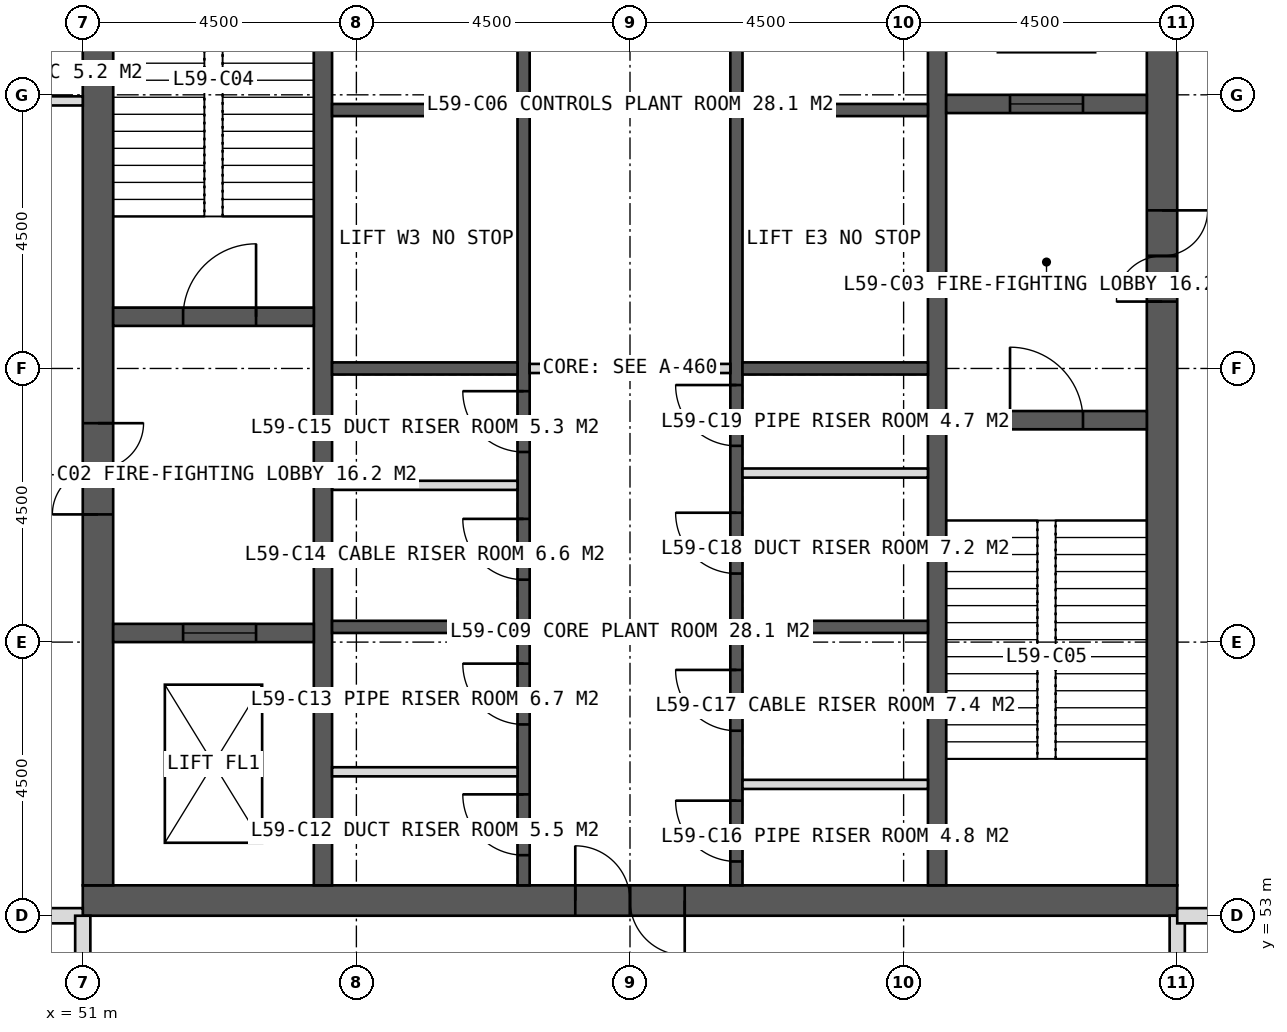
"""IFC4 building model, lengths in metres.
Left out: names, types, materials, properties, quantities, classifications, styles, units other than length and angle.
Written with IfcOpenShell. Run it as: python <this file> out.ifc"""

import sys

from ifc_helpers import new_model, si_unit, direction, frame, frame_2d, origin, place, context, subcontext, project, spatial, rectangle, extrude, element, fill, save


model = new_model("IFC4")
c1 = context("Model", 3, precision=1e-05, world=origin(), true_north=direction((0.0, 1.0)))
c2 = subcontext(c1, "Body", "Model", "MODEL_VIEW")
j1 = project(units=[si_unit("LENGTHUNIT", "METRE"), si_unit("PLANEANGLEUNIT", "RADIAN")], contexts=[c1])
p1 = place(None, origin())
s1 = spatial("IfcSite", under=j1, at=p1, CompositionType="ELEMENT")
p2 = place(p1, origin())
s2 = spatial("IfcBuilding", under=s1, at=p2, CompositionType="ELEMENT")
p3 = place(p2, frame((0.0, 0.0, 245.0)))
s3 = spatial("IfcBuildingStorey", under=s2, at=p3, CompositionType="ELEMENT", Elevation=245.0)
p4 = place(p3, frame((51.0, 53.25, 0.0), z_axis=(0.0, 0.0, 1.0), x_axis=(1.0, 0.0, 0.0)))
e1 = element("IfcWall", 1, at=p4, inside=s3, PredefinedType="SHEAR", context=c2, shape_type="SweptSolid", body=[
    extrude(rectangle(XDim=18.0, YDim=0.5, at=frame_2d((9.0, 0.0))), origin(), (0.0, 0.0, 1.0), 5.0),
])
p5 = place(p4, frame((8.1, 0.0, 0.0)))
e2 = element("IfcOpeningElement", 2, at=p5, cuts=e1, PredefinedType="OPENING", context=c2, shape_type="SweptSolid", body=[
    extrude(rectangle(XDim=1.8, YDim=2.2, at=frame_2d((0.9, 1.1))), frame((0.0, 0.26, 0.0), z_axis=(0.0, -1.0, 0.0), x_axis=(1.0, 0.0, 0.0)), (0.0, 0.0, 1.0), 0.52),
])
p6 = place(p3, frame((51.25, 53.5, 0.0), z_axis=(0.0, 0.0, 1.0), x_axis=(0.0, 1.0, 0.0)))
e3 = element("IfcWall", 3, at=p6, inside=s3, PredefinedType="SHEAR", context=c2, shape_type="SweptSolid", body=[
    extrude(rectangle(XDim=17.0, YDim=0.5, at=frame_2d((8.5, 0.0))), origin(), (0.0, 0.0, 1.0), 5.0),
])
p7 = place(p6, frame((6.1, 0.0, 0.0)))
e4 = element("IfcOpeningElement", 4, at=p7, cuts=e3, PredefinedType="OPENING", context=c2, shape_type="SweptSolid", body=[
    extrude(rectangle(XDim=1.5, YDim=2.2, at=frame_2d((0.75, 1.1))), frame((0.0, 0.26, 0.0), z_axis=(0.0, -1.0, 0.0), x_axis=(1.0, 0.0, 0.0)), (0.0, 0.0, 1.0), 0.52),
])
p8 = place(p3, frame((68.75, 53.5, 0.0), z_axis=(0.0, 0.0, 1.0), x_axis=(0.0, 1.0, 0.0)))
e5 = element("IfcWall", 5, at=p8, inside=s3, PredefinedType="SHEAR", context=c2, shape_type="SweptSolid", body=[
    extrude(rectangle(XDim=17.0, YDim=0.5, at=frame_2d((8.5, 0.0))), origin(), (0.0, 0.0, 1.0), 5.0),
])
p9 = place(p8, frame((9.6, 0.0, 0.0)))
e6 = element("IfcOpeningElement", 6, at=p9, cuts=e5, PredefinedType="OPENING", context=c2, shape_type="SweptSolid", body=[
    extrude(rectangle(XDim=1.5, YDim=2.2, at=frame_2d((0.75, 1.1))), frame((0.0, 0.26, 0.0), z_axis=(0.0, -1.0, 0.0), x_axis=(1.0, 0.0, 0.0)), (0.0, 0.0, 1.0), 0.52),
])
for number, where, z_axis, x_axis in (
    (7, (54.95, 53.5, 0.0), (0.0, 0.0, 1.0), (0.0, 1.0, 0.0)),
    (8, (65.05, 53.5, 0.0), (0.0, 0.0, 1.0), (0.0, 1.0, 0.0)),
):
    element("IfcWall", number, at=place(p3, frame(where, z_axis=z_axis, x_axis=x_axis)), inside=s3, PredefinedType="SHEAR", context=c2, shape_type="SweptSolid", body=[
        extrude(rectangle(XDim=17.0, YDim=0.3, at=frame_2d((8.5, 0.0))), origin(), (0.0, 0.0, 1.0), 5.0),
    ])
p10 = place(p3, frame((58.25, 53.5, 0.0), z_axis=(0.0, 0.0, 1.0), x_axis=(0.0, 1.0, 0.0)))
e9 = element("IfcWall", 9, at=p10, inside=s3, PredefinedType="SHEAR", context=c2, shape_type="SweptSolid", body=[
    extrude(rectangle(XDim=17.0, YDim=0.2, at=frame_2d((8.5, 0.0))), origin(), (0.0, 0.0, 1.0), 5.0),
])
p11 = place(p10, frame((0.496, 0.0, 0.0)))
e10 = element("IfcOpeningElement", 10, at=p11, cuts=e9, PredefinedType="OPENING", context=c2, shape_type="SweptSolid", body=[
    extrude(rectangle(XDim=1.0, YDim=2.1, at=frame_2d((0.5, 1.05))), frame((0.0, 0.11, 0.0), z_axis=(0.0, -1.0, 0.0), x_axis=(1.0, 0.0, 0.0)), (0.0, 0.0, 1.0), 0.22),
])
p12 = place(p10, frame((2.646, 0.0, 0.0)))
e11 = element("IfcOpeningElement", 11, at=p12, cuts=e9, PredefinedType="OPENING", context=c2, shape_type="SweptSolid", body=[
    extrude(rectangle(XDim=1.0, YDim=2.1, at=frame_2d((0.5, 1.05))), frame((0.0, 0.11, 0.0), z_axis=(0.0, -1.0, 0.0), x_axis=(1.0, 0.0, 0.0)), (0.0, 0.0, 1.0), 0.22),
])
p13 = place(p10, frame((5.027, 0.0, 0.0)))
e12 = element("IfcOpeningElement", 12, at=p13, cuts=e9, PredefinedType="OPENING", context=c2, shape_type="SweptSolid", body=[
    extrude(rectangle(XDim=1.0, YDim=2.1, at=frame_2d((0.5, 1.05))), frame((0.0, 0.11, 0.0), z_axis=(0.0, -1.0, 0.0), x_axis=(1.0, 0.0, 0.0)), (0.0, 0.0, 1.0), 0.22),
])
p14 = place(p10, frame((7.126, 0.0, 0.0)))
e13 = element("IfcOpeningElement", 13, at=p14, cuts=e9, PredefinedType="OPENING", context=c2, shape_type="SweptSolid", body=[
    extrude(rectangle(XDim=1.0, YDim=2.1, at=frame_2d((0.5, 1.05))), frame((0.0, 0.11, 0.0), z_axis=(0.0, -1.0, 0.0), x_axis=(1.0, 0.0, 0.0)), (0.0, 0.0, 1.0), 0.22),
])
p15 = place(p3, frame((61.75, 53.5, 0.0), z_axis=(0.0, 0.0, 1.0), x_axis=(0.0, 1.0, 0.0)))
e14 = element("IfcWall", 14, at=p15, inside=s3, PredefinedType="SHEAR", context=c2, shape_type="SweptSolid", body=[
    extrude(rectangle(XDim=17.0, YDim=0.2, at=frame_2d((8.5, 0.0))), origin(), (0.0, 0.0, 1.0), 5.0),
])
p16 = place(p15, frame((0.393, 0.0, 0.0)))
e15 = element("IfcOpeningElement", 15, at=p16, cuts=e14, PredefinedType="OPENING", context=c2, shape_type="SweptSolid", body=[
    extrude(rectangle(XDim=1.0, YDim=2.1, at=frame_2d((0.5, 1.05))), frame((0.0, 0.11, 0.0), z_axis=(0.0, -1.0, 0.0), x_axis=(1.0, 0.0, 0.0)), (0.0, 0.0, 1.0), 0.22),
])
p17 = place(p15, frame((2.542, 0.0, 0.0)))
e16 = element("IfcOpeningElement", 16, at=p17, cuts=e14, PredefinedType="OPENING", context=c2, shape_type="SweptSolid", body=[
    extrude(rectangle(XDim=1.0, YDim=2.1, at=frame_2d((0.5, 1.05))), frame((0.0, 0.11, 0.0), z_axis=(0.0, -1.0, 0.0), x_axis=(1.0, 0.0, 0.0)), (0.0, 0.0, 1.0), 0.22),
])
p18 = place(p15, frame((5.127, 0.0, 0.0)))
e17 = element("IfcOpeningElement", 17, at=p18, cuts=e14, PredefinedType="OPENING", context=c2, shape_type="SweptSolid", body=[
    extrude(rectangle(XDim=1.0, YDim=2.1, at=frame_2d((0.5, 1.05))), frame((0.0, 0.11, 0.0), z_axis=(0.0, -1.0, 0.0), x_axis=(1.0, 0.0, 0.0)), (0.0, 0.0, 1.0), 0.22),
])
p19 = place(p15, frame((7.228, 0.0, 0.0)))
e18 = element("IfcOpeningElement", 18, at=p19, cuts=e14, PredefinedType="OPENING", context=c2, shape_type="SweptSolid", body=[
    extrude(rectangle(XDim=1.0, YDim=2.1, at=frame_2d((0.5, 1.05))), frame((0.0, 0.11, 0.0), z_axis=(0.0, -1.0, 0.0), x_axis=(1.0, 0.0, 0.0)), (0.0, 0.0, 1.0), 0.22),
])
for number, where, z_axis, x_axis in (
    (19, (55.1, 57.75, 0.0), (0.0, 0.0, 1.0), (1.0, 0.0, 0.0)),
    (20, (61.85, 57.75, 0.0), (0.0, 0.0, 1.0), (1.0, 0.0, 0.0)),
    (21, (55.1, 62.0, 0.0), (0.0, 0.0, 1.0), (1.0, 0.0, 0.0)),
    (22, (61.85, 62.0, 0.0), (0.0, 0.0, 1.0), (1.0, 0.0, 0.0)),
    (23, (55.1, 66.25, 0.0), (0.0, 0.0, 1.0), (1.0, 0.0, 0.0)),
    (24, (61.85, 66.25, 0.0), (0.0, 0.0, 1.0), (1.0, 0.0, 0.0)),
):
    element("IfcWall", number, at=place(p3, frame(where, z_axis=z_axis, x_axis=x_axis)), inside=s3, PredefinedType="SHEAR", context=c2, shape_type="SweptSolid", body=[
        extrude(rectangle(XDim=3.05, YDim=0.2, at=frame_2d((1.525, 0.0))), origin(), (0.0, 0.0, 1.0), 5.0),
    ])
p20 = place(p3, frame((51.5, 62.85, 0.0), z_axis=(0.0, 0.0, 1.0), x_axis=(1.0, 0.0, 0.0)))
e25 = element("IfcWall", 25, at=p20, inside=s3, PredefinedType="SHEAR", context=c2, shape_type="SweptSolid", body=[
    extrude(rectangle(XDim=3.3, YDim=0.3, at=frame_2d((1.65, 0.0))), origin(), (0.0, 0.0, 1.0), 5.0),
])
p21 = place(p20, frame((1.15, 0.0, 0.0)))
e26 = element("IfcOpeningElement", 26, at=p21, cuts=e25, PredefinedType="OPENING", context=c2, shape_type="SweptSolid", body=[
    extrude(rectangle(XDim=1.2, YDim=2.1, at=frame_2d((0.6, 1.05))), frame((0.0, 0.16, 0.0), z_axis=(0.0, -1.0, 0.0), x_axis=(1.0, 0.0, 0.0)), (0.0, 0.0, 1.0), 0.32),
])
p22 = place(p3, frame((51.5, 57.65, 0.0), z_axis=(0.0, 0.0, 1.0), x_axis=(1.0, 0.0, 0.0)))
e27 = element("IfcWall", 27, at=p22, inside=s3, PredefinedType="SHEAR", context=c2, shape_type="SweptSolid", body=[
    extrude(rectangle(XDim=3.3, YDim=0.3, at=frame_2d((1.65, 0.0))), origin(), (0.0, 0.0, 1.0), 5.0),
])
p23 = place(p22, frame((1.15, 0.0, 0.0)))
e28 = element("IfcOpeningElement", 28, at=p23, cuts=e27, PredefinedType="OPENING", context=c2, shape_type="SweptSolid", body=[
    extrude(rectangle(XDim=1.2, YDim=2.2, at=frame_2d((0.6, 1.1))), frame((0.0, 0.16, 0.0), z_axis=(0.0, -1.0, 0.0), x_axis=(1.0, 0.0, 0.0)), (0.0, 0.0, 1.0), 0.32),
])
p24 = place(p3, frame((65.2, 61.15, 0.0), z_axis=(0.0, 0.0, 1.0), x_axis=(1.0, 0.0, 0.0)))
e29 = element("IfcWall", 29, at=p24, inside=s3, PredefinedType="SHEAR", context=c2, shape_type="SweptSolid", body=[
    extrude(rectangle(XDim=3.3, YDim=0.3, at=frame_2d((1.65, 0.0))), origin(), (0.0, 0.0, 1.0), 5.0),
])
p25 = place(p24, frame((1.05, 0.0, 0.0)))
e30 = element("IfcOpeningElement", 30, at=p25, cuts=e29, PredefinedType="OPENING", context=c2, shape_type="SweptSolid", body=[
    extrude(rectangle(XDim=1.2, YDim=2.1, at=frame_2d((0.6, 1.05))), frame((0.0, 0.16, 0.0), z_axis=(0.0, -1.0, 0.0), x_axis=(1.0, 0.0, 0.0)), (0.0, 0.0, 1.0), 0.32),
])
p26 = place(p3, frame((65.2, 66.35, 0.0), z_axis=(0.0, 0.0, 1.0), x_axis=(1.0, 0.0, 0.0)))
e31 = element("IfcWall", 31, at=p26, inside=s3, PredefinedType="SHEAR", context=c2, shape_type="SweptSolid", body=[
    extrude(rectangle(XDim=3.3, YDim=0.3, at=frame_2d((1.65, 0.0))), origin(), (0.0, 0.0, 1.0), 5.0),
])
p27 = place(p26, frame((1.05, 0.0, 0.0)))
e32 = element("IfcOpeningElement", 32, at=p27, cuts=e31, PredefinedType="OPENING", context=c2, shape_type="SweptSolid", body=[
    extrude(rectangle(XDim=1.2, YDim=2.2, at=frame_2d((0.6, 1.1))), frame((0.0, 0.16, 0.0), z_axis=(0.0, -1.0, 0.0), x_axis=(1.0, 0.0, 0.0)), (0.0, 0.0, 1.0), 0.32),
])
p28 = place(p3, frame((51.0, 53.0, 0.0), z_axis=(0.0, 0.0, 1.0), x_axis=(-1.0, 0.0, 0.0)))
e33 = element("IfcWall", 33, at=p28, inside=s3, PredefinedType="SOLIDWALL", context=c2, shape_type="SweptSolid", body=[
    extrude(rectangle(XDim=13.425, YDim=0.25, at=frame_2d((6.712, 0.0))), origin(), (0.0, 0.0, 1.0), 4.75),
])
p29 = place(p28, frame((1.5, 0.0, 0.0)))
e34 = element("IfcOpeningElement", 34, at=p29, cuts=e33, PredefinedType="OPENING", context=c2, shape_type="SweptSolid", body=[
    extrude(rectangle(XDim=1.8, YDim=2.2, at=frame_2d((0.9, 1.1))), frame((0.0, 0.135, 0.0), z_axis=(0.0, -1.0, 0.0), x_axis=(1.0, 0.0, 0.0)), (0.0, 0.0, 1.0), 0.27),
])
p30 = place(p3, frame((51.0, 53.0, 0.0), z_axis=(0.0, 0.0, 1.0), x_axis=(0.0, -1.0, 0.0)))
e35 = element("IfcWall", 35, at=p30, inside=s3, PredefinedType="SOLIDWALL", context=c2, shape_type="SweptSolid", body=[
    extrude(rectangle(XDim=13.425, YDim=0.25, at=frame_2d((6.712, 0.0))), origin(), (0.0, 0.0, 1.0), 4.75),
])
p31 = place(p30, frame((1.5, 0.0, 0.0)))
e36 = element("IfcOpeningElement", 36, at=p31, cuts=e35, PredefinedType="OPENING", context=c2, shape_type="SweptSolid", body=[
    extrude(rectangle(XDim=1.8, YDim=2.2, at=frame_2d((0.9, 1.1))), frame((0.0, 0.135, 0.0), z_axis=(0.0, -1.0, 0.0), x_axis=(1.0, 0.0, 0.0)), (0.0, 0.0, 1.0), 0.27),
])
p32 = place(p3, frame((69.0, 53.0, 0.0), z_axis=(0.0, 0.0, 1.0), x_axis=(0.0, -1.0, 0.0)))
e37 = element("IfcWall", 37, at=p32, inside=s3, PredefinedType="SOLIDWALL", context=c2, shape_type="SweptSolid", body=[
    extrude(rectangle(XDim=13.425, YDim=0.25, at=frame_2d((6.712, 0.0))), origin(), (0.0, 0.0, 1.0), 4.75),
])
p33 = place(p32, frame((1.5, 0.0, 0.0)))
e38 = element("IfcOpeningElement", 38, at=p33, cuts=e37, PredefinedType="OPENING", context=c2, shape_type="SweptSolid", body=[
    extrude(rectangle(XDim=1.8, YDim=2.2, at=frame_2d((0.9, 1.1))), frame((0.0, 0.135, 0.0), z_axis=(0.0, -1.0, 0.0), x_axis=(1.0, 0.0, 0.0)), (0.0, 0.0, 1.0), 0.27),
])
p34 = place(p3, frame((69.0, 53.0, 0.0), z_axis=(0.0, 0.0, 1.0), x_axis=(1.0, 0.0, 0.0)))
e39 = element("IfcWall", 39, at=p34, inside=s3, PredefinedType="SOLIDWALL", context=c2, shape_type="SweptSolid", body=[
    extrude(rectangle(XDim=13.425, YDim=0.25, at=frame_2d((6.712, 0.0))), origin(), (0.0, 0.0, 1.0), 4.75),
])
p35 = place(p34, frame((1.5, 0.0, 0.0)))
e40 = element("IfcOpeningElement", 40, at=p35, cuts=e39, PredefinedType="OPENING", context=c2, shape_type="SweptSolid", body=[
    extrude(rectangle(XDim=1.8, YDim=2.2, at=frame_2d((0.9, 1.1))), frame((0.0, 0.135, 0.0), z_axis=(0.0, -1.0, 0.0), x_axis=(1.0, 0.0, 0.0)), (0.0, 0.0, 1.0), 0.27),
])
p36 = place(p3, frame((51.0, 66.4, 0.0), z_axis=(0.0, 0.0, 1.0), x_axis=(-1.0, 0.0, 0.0)))
e41 = element("IfcWall", 41, at=p36, inside=s3, PredefinedType="PARTITIONING", context=c2, shape_type="SweptSolid", body=[
    extrude(rectangle(XDim=2.5, YDim=0.15, at=frame_2d((1.25, 0.0))), origin(), (0.0, 0.0, 1.0), 3.25),
])
for number, where, z_axis, x_axis in (
    (42, (55.1, 55.367, 0.0), (0.0, 0.0, 1.0), (1.0, 0.0, 0.0)),
    (43, (61.85, 55.16, 0.0), (0.0, 0.0, 1.0), (1.0, 0.0, 0.0)),
    (44, (55.1, 60.078, 0.0), (0.0, 0.0, 1.0), (1.0, 0.0, 0.0)),
    (45, (61.85, 60.28, 0.0), (0.0, 0.0, 1.0), (1.0, 0.0, 0.0)),
):
    element("IfcWall", number, at=place(p3, frame(where, z_axis=z_axis, x_axis=x_axis)), inside=s3, PredefinedType="PARTITIONING", context=c2, shape_type="SweptSolid", body=[
        extrude(rectangle(XDim=3.05, YDim=0.15, at=frame_2d((1.525, 0.0))), origin(), (0.0, 0.0, 1.0), 4.75),
    ])
p37 = place(p3, frame((58.35, 62.0, 0.0), z_axis=(0.0, 0.0, 1.0), x_axis=(1.0, 0.0, 0.0)))
e46 = element("IfcWall", 46, at=p37, inside=s3, PredefinedType="PARTITIONING", context=c2, shape_type="SweptSolid", body=[
    extrude(rectangle(XDim=3.3, YDim=0.15, at=frame_2d((1.65, 0.0))), origin(), (0.0, 0.0, 1.0), 4.75),
])
p38 = place(p7, origin())
e47 = element("IfcDoor", 47, at=p38, inside=s3, OperationType="DOUBLE_DOOR_SINGLE_SWING", PredefinedType="DOOR", context=c2, shape_type="SweptSolid", body=[
    extrude(rectangle(XDim=1.5, YDim=2.2, at=frame_2d((0.75, 1.1))), frame((0.0, 0.025, 0.0), z_axis=(0.0, -1.0, 0.0), x_axis=(1.0, 0.0, 0.0)), (0.0, 0.0, 1.0), 0.05),
])
fill(e4, e47)
p39 = place(p9, origin())
e48 = element("IfcDoor", 48, at=p39, inside=s3, OperationType="DOUBLE_DOOR_SINGLE_SWING", PredefinedType="DOOR", context=c2, shape_type="SweptSolid", body=[
    extrude(rectangle(XDim=1.5, YDim=2.2, at=frame_2d((0.75, 1.1))), frame((0.0, 0.025, 0.0), z_axis=(0.0, -1.0, 0.0), x_axis=(1.0, 0.0, 0.0)), (0.0, 0.0, 1.0), 0.05),
])
fill(e6, e48)
p40 = place(p21, origin())
e49 = element("IfcDoor", 49, at=p40, inside=s3, OperationType="SINGLE_SWING_RIGHT", PredefinedType="DOOR", context=c2, shape_type="SweptSolid", body=[
    extrude(rectangle(XDim=1.2, YDim=2.1, at=frame_2d((0.6, 1.05))), frame((0.0, 0.025, 0.0), z_axis=(0.0, -1.0, 0.0), x_axis=(1.0, 0.0, 0.0)), (0.0, 0.0, 1.0), 0.05),
])
fill(e26, e49)
p41 = place(p25, origin())
e50 = element("IfcDoor", 50, at=p41, inside=s3, OperationType="SINGLE_SWING_LEFT", PredefinedType="DOOR", context=c2, shape_type="SweptSolid", body=[
    extrude(rectangle(XDim=1.2, YDim=2.1, at=frame_2d((0.6, 1.05))), frame((0.0, 0.025, 0.0), z_axis=(0.0, -1.0, 0.0), x_axis=(1.0, 0.0, 0.0)), (0.0, 0.0, 1.0), 0.05),
])
fill(e30, e50)
p42 = place(p23, origin())
e51 = element("IfcDoor", 51, at=p42, inside=s3, OperationType="SLIDING_TO_LEFT", PredefinedType="DOOR", context=c2, shape_type="SweptSolid", body=[
    extrude(rectangle(XDim=1.2, YDim=2.2, at=frame_2d((0.6, 1.1))), frame((0.0, 0.025, 0.0), z_axis=(0.0, -1.0, 0.0), x_axis=(1.0, 0.0, 0.0)), (0.0, 0.0, 1.0), 0.05),
])
fill(e28, e51)
p43 = place(p27, origin())
e52 = element("IfcDoor", 52, at=p43, inside=s3, OperationType="SLIDING_TO_LEFT", PredefinedType="DOOR", context=c2, shape_type="SweptSolid", body=[
    extrude(rectangle(XDim=1.2, YDim=2.2, at=frame_2d((0.6, 1.1))), frame((0.0, 0.025, 0.0), z_axis=(0.0, -1.0, 0.0), x_axis=(1.0, 0.0, 0.0)), (0.0, 0.0, 1.0), 0.05),
])
fill(e32, e52)
p44 = place(p11, origin())
e53 = element("IfcDoor", 53, at=p44, inside=s3, OperationType="SINGLE_SWING_RIGHT", PredefinedType="DOOR", context=c2, shape_type="SweptSolid", body=[
    extrude(rectangle(XDim=1.0, YDim=2.1, at=frame_2d((0.5, 1.05))), frame((0.0, 0.025, 0.0), z_axis=(0.0, -1.0, 0.0), x_axis=(1.0, 0.0, 0.0)), (0.0, 0.0, 1.0), 0.05),
])
fill(e10, e53)
p45 = place(p12, origin())
e54 = element("IfcDoor", 54, at=p45, inside=s3, OperationType="SINGLE_SWING_RIGHT", PredefinedType="DOOR", context=c2, shape_type="SweptSolid", body=[
    extrude(rectangle(XDim=1.0, YDim=2.1, at=frame_2d((0.5, 1.05))), frame((0.0, 0.025, 0.0), z_axis=(0.0, -1.0, 0.0), x_axis=(1.0, 0.0, 0.0)), (0.0, 0.0, 1.0), 0.05),
])
fill(e11, e54)
p46 = place(p16, origin())
e55 = element("IfcDoor", 55, at=p46, inside=s3, OperationType="SINGLE_SWING_RIGHT", PredefinedType="DOOR", context=c2, shape_type="SweptSolid", body=[
    extrude(rectangle(XDim=1.0, YDim=2.1, at=frame_2d((0.5, 1.05))), frame((0.0, 0.025, 0.0), z_axis=(0.0, -1.0, 0.0), x_axis=(1.0, 0.0, 0.0)), (0.0, 0.0, 1.0), 0.05),
])
fill(e15, e55)
p47 = place(p17, origin())
e56 = element("IfcDoor", 56, at=p47, inside=s3, OperationType="SINGLE_SWING_RIGHT", PredefinedType="DOOR", context=c2, shape_type="SweptSolid", body=[
    extrude(rectangle(XDim=1.0, YDim=2.1, at=frame_2d((0.5, 1.05))), frame((0.0, 0.025, 0.0), z_axis=(0.0, -1.0, 0.0), x_axis=(1.0, 0.0, 0.0)), (0.0, 0.0, 1.0), 0.05),
])
fill(e16, e56)
p48 = place(p13, origin())
e57 = element("IfcDoor", 57, at=p48, inside=s3, OperationType="SINGLE_SWING_RIGHT", PredefinedType="DOOR", context=c2, shape_type="SweptSolid", body=[
    extrude(rectangle(XDim=1.0, YDim=2.1, at=frame_2d((0.5, 1.05))), frame((0.0, 0.025, 0.0), z_axis=(0.0, -1.0, 0.0), x_axis=(1.0, 0.0, 0.0)), (0.0, 0.0, 1.0), 0.05),
])
fill(e12, e57)
p49 = place(p14, origin())
e58 = element("IfcDoor", 58, at=p49, inside=s3, OperationType="SINGLE_SWING_RIGHT", PredefinedType="DOOR", context=c2, shape_type="SweptSolid", body=[
    extrude(rectangle(XDim=1.0, YDim=2.1, at=frame_2d((0.5, 1.05))), frame((0.0, 0.025, 0.0), z_axis=(0.0, -1.0, 0.0), x_axis=(1.0, 0.0, 0.0)), (0.0, 0.0, 1.0), 0.05),
])
fill(e13, e58)
p50 = place(p18, origin())
e59 = element("IfcDoor", 59, at=p50, inside=s3, OperationType="SINGLE_SWING_RIGHT", PredefinedType="DOOR", context=c2, shape_type="SweptSolid", body=[
    extrude(rectangle(XDim=1.0, YDim=2.1, at=frame_2d((0.5, 1.05))), frame((0.0, 0.025, 0.0), z_axis=(0.0, -1.0, 0.0), x_axis=(1.0, 0.0, 0.0)), (0.0, 0.0, 1.0), 0.05),
])
fill(e17, e59)
p51 = place(p19, origin())
e60 = element("IfcDoor", 60, at=p51, inside=s3, OperationType="SINGLE_SWING_RIGHT", PredefinedType="DOOR", context=c2, shape_type="SweptSolid", body=[
    extrude(rectangle(XDim=1.0, YDim=2.1, at=frame_2d((0.5, 1.05))), frame((0.0, 0.025, 0.0), z_axis=(0.0, -1.0, 0.0), x_axis=(1.0, 0.0, 0.0)), (0.0, 0.0, 1.0), 0.05),
])
fill(e18, e60)
p52 = place(p5, origin())
e61 = element("IfcDoor", 61, at=p52, inside=s3, OperationType="DOUBLE_DOOR_SINGLE_SWING", PredefinedType="DOOR", context=c2, shape_type="SweptSolid", body=[
    extrude(rectangle(XDim=1.8, YDim=2.2, at=frame_2d((0.9, 1.1))), frame((0.0, 0.025, 0.0), z_axis=(0.0, -1.0, 0.0), x_axis=(1.0, 0.0, 0.0)), (0.0, 0.0, 1.0), 0.05),
])
fill(e2, e61)
save(model, sys.argv[1])
